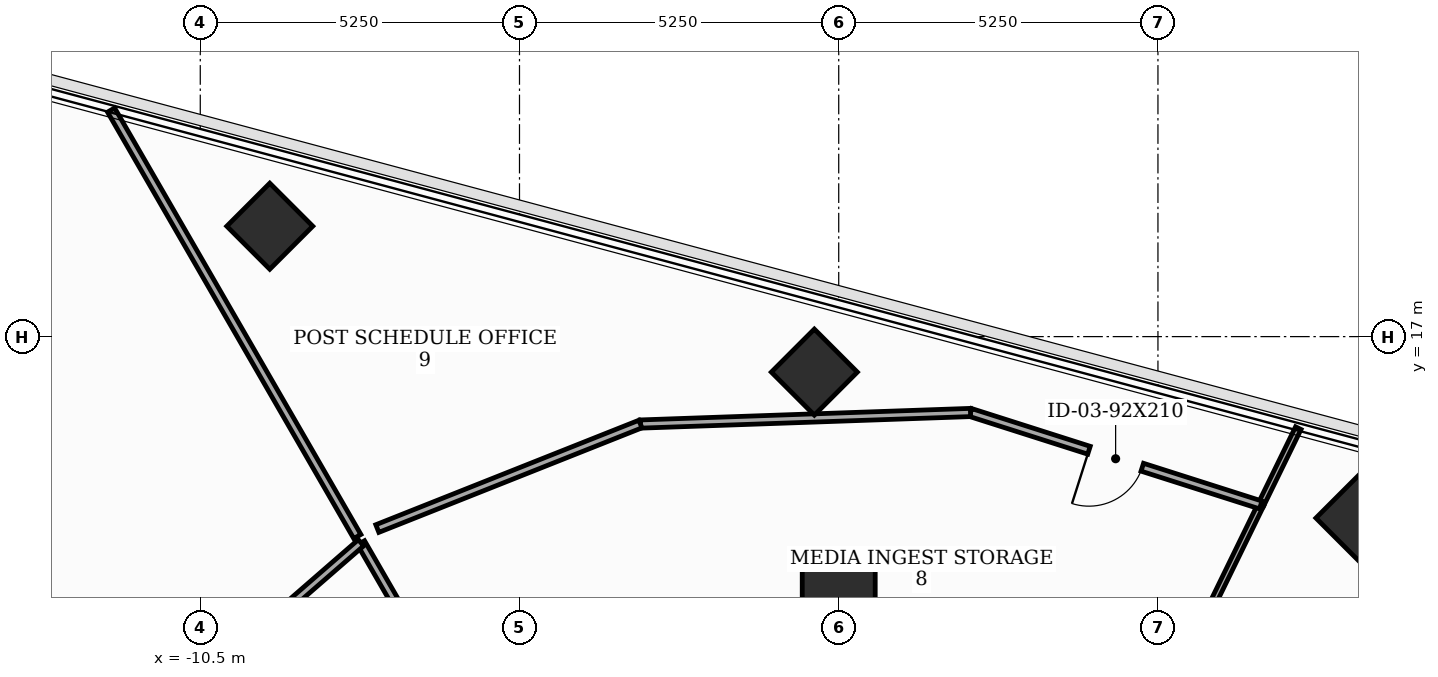
"""IFC4 building model, lengths in metres.
Left out: names, types, materials, properties, quantities, classifications, styles, units other than length and angle.
Written with IfcOpenShell. Run it as: python <this file> out.ifc"""

import sys

from ifc_helpers import new_model, si_unit, direction, frame, frame_2d, origin, origin_2d, place, context, subcontext, project, spatial, rectangle, extrude, element, fill, save


model = new_model("IFC4")
c1 = context("Model", 3, precision=1e-05, world=origin(), true_north=direction((0.0, 1.0)))
c2 = subcontext(c1, "Body", "Model", "MODEL_VIEW")
j1 = project(units=[si_unit("LENGTHUNIT", "METRE"), si_unit("PLANEANGLEUNIT", "RADIAN")], contexts=[c1])
p1 = place(None, origin())
s1 = spatial("IfcSite", under=j1, at=p1, CompositionType="ELEMENT")
p2 = place(p1, origin())
s2 = spatial("IfcBuilding", under=s1, at=p2, CompositionType="ELEMENT")
p3 = place(p2, frame((0.0, 0.0, 206.4)))
s3 = spatial("IfcBuildingStorey", under=s2, at=p3, CompositionType="ELEMENT", Elevation=206.4)
p4 = place(p3, frame((0.0, 12.6, 0.0), z_axis=(0.0, 0.0, 1.0), x_axis=(1.0, 0.0, 0.0)))
e1 = element("IfcColumn", 1, at=p4, inside=s3, PredefinedType="COLUMN", context=c2, shape_type="SweptSolid", body=[
    extrude(rectangle(XDim=1.2, YDim=1.2, at=origin_2d()), origin(), (0.0, 0.0, 1.0), 3.7),
])
for number, where, z_axis, x_axis in (
    (2, (8.555, 14.016, 0.0), (0.0, 0.0, 1.0), (0.707, 0.707, 0.0)),
    (3, (-0.401, 16.416, 0.0), (0.0, 0.0, 1.0), (0.707, 0.707, 0.0)),
    (4, (-9.357, 18.816, 0.0), (0.0, 0.0, 1.0), (0.707, 0.707, 0.0)),
):
    element("IfcColumn", number, at=place(p3, frame(where, z_axis=z_axis, x_axis=x_axis)), inside=s3, PredefinedType="COLUMN", context=c2, shape_type="SweptSolid", body=[
        extrude(rectangle(XDim=1.0, YDim=1.0, at=origin_2d()), origin(), (0.0, 0.0, 1.0), 3.7),
    ])
p5 = place(p3, frame((6.941, 14.231, 0.0), z_axis=(0.0, 0.0, 1.0), x_axis=(-0.43841759586, -0.898771390088, 0.0)))
e5 = element("IfcWall", 5, at=p5, inside=s3, PredefinedType="MOVABLE", context=c2, shape_type="SweptSolid", body=[
    extrude(rectangle(XDim=3.984, YDim=0.1, at=frame_2d((1.992, 0.0))), origin(), (0.0, 0.0, 1.0), 2.885),
])
p6 = place(p3, frame((7.558, 15.495, 0.0), z_axis=(0.0, 0.0, 1.0), x_axis=(-0.438792927977, -0.898588207333, 0.0)))
e6 = element("IfcWall", 6, at=p6, inside=s3, PredefinedType="MOVABLE", context=c2, shape_type="SweptSolid", body=[
    extrude(rectangle(XDim=1.406, YDim=0.1, at=frame_2d((0.703, 0.0))), origin(), (0.0, 0.0, 1.0), 2.985),
])
p7 = place(p3, frame((6.941, 14.231, 0.0), z_axis=(0.0, 0.0, 1.0), x_axis=(-0.952809240113, 0.303569682208, 0.0)))
e7 = element("IfcWall", 7, at=p7, inside=s3, PredefinedType="PARTITIONING", context=c2, shape_type="SweptSolid", body=[
    extrude(rectangle(XDim=5.01, YDim=0.135, at=frame_2d((2.505, 0.0))), origin(), (0.0, 0.0, 1.0), 2.985),
])
p8 = place(p7, frame((2.045, 0.0, 0.0)))
e8 = element("IfcOpeningElement", 8, at=p8, cuts=e7, PredefinedType="OPENING", context=c2, shape_type="SweptSolid", body=[
    extrude(rectangle(XDim=0.92, YDim=2.1, at=frame_2d((0.46, 1.05))), frame((0.0, 0.077, 0.0), z_axis=(0.0, -1.0, 0.0), x_axis=(1.0, 0.0, 0.0)), (0.0, 0.0, 1.0), 0.155),
])
p9 = place(p3, frame((2.167, 15.752, 0.0), z_axis=(0.0, 0.0, 1.0), x_axis=(-0.999388305695, -0.034971623345, 0.0)))
e9 = element("IfcWall", 9, at=p9, inside=s3, PredefinedType="PARTITIONING", context=c2, shape_type="SweptSolid", body=[
    extrude(rectangle(XDim=5.431, YDim=0.135, at=frame_2d((2.716, 0.0))), origin(), (0.0, 0.0, 1.0), 2.985),
])
p10 = place(p3, frame((-3.261, 15.562, 0.0), z_axis=(0.0, 0.0, 1.0), x_axis=(-0.929345677851, -0.369210794885, 0.0)))
e10 = element("IfcWall", 10, at=p10, inside=s3, PredefinedType="PARTITIONING", context=c2, shape_type="SweptSolid", body=[
    extrude(rectangle(XDim=4.656, YDim=0.135, at=frame_2d((2.328, 0.0))), origin(), (0.0, 0.0, 1.0), 2.985),
])
p11 = place(p3, frame((-7.857, 13.609, 0.0), z_axis=(0.0, 0.0, 1.0), x_axis=(0.499920397431, -0.866071357471, 0.0)))
e11 = element("IfcWall", 11, at=p11, inside=s3, PredefinedType="PARTITIONING", context=c2, shape_type="SweptSolid", body=[
    extrude(rectangle(XDim=3.417, YDim=0.135, at=frame_2d((1.708, 0.0))), origin(), (0.0, 0.0, 1.0), 2.885),
])
p12 = place(p3, frame((-11.967, 20.726, 0.0), z_axis=(0.0, 0.0, 1.0), x_axis=(0.499980770555, -0.866036505625, 0.0)))
e12 = element("IfcWall", 12, at=p12, inside=s3, PredefinedType="PARTITIONING", context=c2, shape_type="SweptSolid", body=[
    extrude(rectangle(XDim=8.099, YDim=0.135, at=frame_2d((4.05, 0.0))), origin(), (0.0, 0.0, 1.0), 2.985),
])
p13 = place(p3, frame((-12.701, 9.398, 0.0), z_axis=(0.0, 0.0, 1.0), x_axis=(0.754700505452, 0.656069468174, 0.0)))
e13 = element("IfcWall", 13, at=p13, inside=s3, PredefinedType="PARTITIONING", context=c2, shape_type="SweptSolid", body=[
    extrude(rectangle(XDim=6.418, YDim=0.135, at=frame_2d((3.209, 0.0))), origin(), (0.0, 0.0, 1.0), 3.5),
])
p14 = place(p8, origin())
e14 = element("IfcDoor", 14, at=p14, inside=s3, OperationType="SINGLE_SWING_RIGHT", PredefinedType="DOOR", context=c2, shape_type="SweptSolid", body=[
    extrude(rectangle(XDim=0.92, YDim=2.1, at=frame_2d((0.46, 1.05))), frame((0.0, 0.025, 0.0), z_axis=(0.0, -1.0, 0.0), x_axis=(1.0, 0.0, 0.0)), (0.0, 0.0, 1.0), 0.05),
])
fill(e8, e14)
save(model, sys.argv[1])
